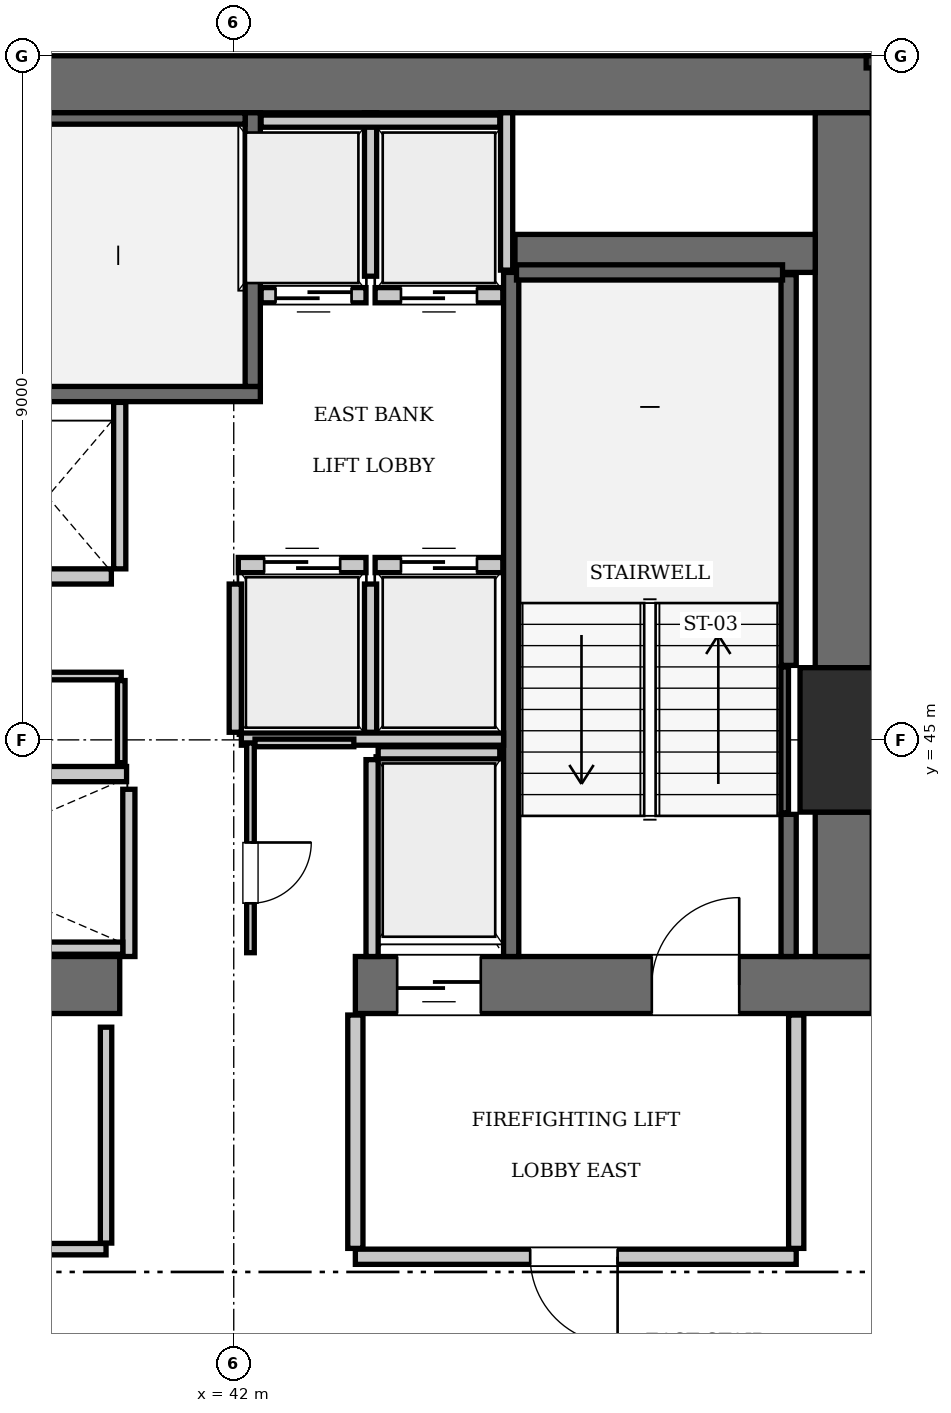
"""IFC4 building model, lengths in metres.
Left out: names, types, materials, properties, quantities, classifications, styles, units other than length and angle.
Written with IfcOpenShell. Run it as: python <this file> out.ifc"""

import sys

from ifc_helpers import new_model, si_unit, direction, frame, frame_2d, origin, origin_2d, place, context, subcontext, project, spatial, rectangle, extrude, element, fill, save


model = new_model("IFC4")
c1 = context("Model", 3, precision=1e-05, world=origin(), true_north=direction((0.0, 1.0)))
c2 = subcontext(c1, "Body", "Model", "MODEL_VIEW")
j1 = project(units=[si_unit("LENGTHUNIT", "METRE"), si_unit("PLANEANGLEUNIT", "RADIAN")], contexts=[c1])
p1 = place(None, origin())
s1 = spatial("IfcSite", under=j1, at=p1, CompositionType="ELEMENT")
p2 = place(p1, origin())
s2 = spatial("IfcBuilding", under=s1, at=p2, CompositionType="ELEMENT")
p3 = place(p2, frame((0.0, 0.0, 169.75)))
s3 = spatial("IfcBuildingStorey", under=s2, at=p3, CompositionType="ELEMENT", Elevation=169.75)
p4 = place(p3, frame((50.4, 45.0, 0.0), z_axis=(0.0, 0.0, 1.0), x_axis=(1.0, 0.0, 0.0)))
e1 = element("IfcColumn", 1, at=p4, inside=s3, PredefinedType="COLUMN", context=c2, shape_type="SweptSolid", body=[
    extrude(rectangle(XDim=1.9, YDim=1.9, at=origin_2d()), origin(), (0.0, 0.0, 1.0), 3.85),
])
p5 = place(p3, frame((25.2, 53.625, 0.0), z_axis=(0.0, 0.0, 1.0), x_axis=(1.0, 0.0, 0.0)))
e2 = element("IfcWall", 2, at=p5, inside=s3, PredefinedType="SHEAR", context=c2, shape_type="SweptSolid", body=[
    extrude(rectangle(XDim=25.2, YDim=0.75, at=frame_2d((12.6, 0.0))), origin(), (0.0, 0.0, 1.0), 3.85),
])
p6 = place(p3, frame((35.1, 41.775, 0.0), z_axis=(0.0, 0.0, 1.0), x_axis=(1.0, 0.0, 0.0)))
e3 = element("IfcWall", 3, at=p6, inside=s3, PredefinedType="SHEAR", context=c2, shape_type="SweptSolid", body=[
    extrude(rectangle(XDim=5.4, YDim=0.75, at=frame_2d((2.7, 0.0))), origin(), (0.0, 0.0, 1.0), 3.85),
])
p7 = place(p3, frame((43.6, 41.775, 0.0), z_axis=(0.0, 0.0, 1.0), x_axis=(1.0, 0.0, 0.0)))
e4 = element("IfcWall", 4, at=p7, inside=s3, PredefinedType="SHEAR", context=c2, shape_type="SweptSolid", body=[
    extrude(rectangle(XDim=6.8, YDim=0.75, at=frame_2d((3.4, 0.0))), origin(), (0.0, 0.0, 1.0), 3.85),
])
p8 = place(p7, frame((3.9, 0.0, 0.0)))
e5 = element("IfcOpeningElement", 5, at=p8, cuts=e4, PredefinedType="OPENING", context=c2, shape_type="SweptSolid", body=[
    extrude(rectangle(XDim=1.15, YDim=2.15, at=frame_2d((0.575, 1.075))), frame((0.0, 0.385, 0.0), z_axis=(0.0, -1.0, 0.0), x_axis=(1.0, 0.0, 0.0)), (0.0, 0.0, 1.0), 0.77),
])
p9 = place(p7, frame((0.55, 0.0, 0.0)))
e6 = element("IfcOpeningElement", 6, at=p9, cuts=e4, PredefinedType="OPENING", context=c2, shape_type="SweptSolid", body=[
    extrude(rectangle(XDim=1.1, YDim=2.2, at=frame_2d((0.55, 1.1))), frame((0.0, 0.385, 0.0), z_axis=(0.0, -1.0, 0.0), x_axis=(1.0, 0.0, 0.0)), (0.0, 0.0, 1.0), 0.77),
])
p10 = place(p3, frame((50.025, 42.15, 0.0), z_axis=(0.0, 0.0, 1.0), x_axis=(0.0, 1.0, 0.0)))
e7 = element("IfcWall", 7, at=p10, inside=s3, PredefinedType="SHEAR", context=c2, shape_type="SweptSolid", body=[
    extrude(rectangle(XDim=1.9, YDim=0.75, at=frame_2d((0.95, 0.0))), origin(), (0.0, 0.0, 1.0), 3.85),
])
p11 = place(p3, frame((50.025, 45.95, 0.0), z_axis=(0.0, 0.0, 1.0), x_axis=(0.0, 1.0, 0.0)))
e8 = element("IfcWall", 8, at=p11, inside=s3, PredefinedType="SHEAR", context=c2, shape_type="SweptSolid", body=[
    extrude(rectangle(XDim=7.3, YDim=0.75, at=frame_2d((3.65, 0.0))), origin(), (0.0, 0.0, 1.0), 3.85),
])
p12 = place(p3, frame((45.7, 51.4, 0.0), z_axis=(0.0, 0.0, 1.0), x_axis=(1.0, 0.0, 0.0)))
e9 = element("IfcWall", 9, at=p12, inside=s3, PredefinedType="SHEAR", context=c2, shape_type="SweptSolid", body=[
    extrude(rectangle(XDim=3.95, YDim=0.5, at=frame_2d((1.975, 0.0))), origin(), (0.0, 0.0, 1.0), 3.85),
])
p13 = place(p3, frame((33.25, 49.55, 0.0), z_axis=(0.0, 0.0, 1.0), x_axis=(1.0, 0.0, 0.0)))
e10 = element("IfcWall", 10, at=p13, inside=s3, PredefinedType="SOLIDWALL", context=c2, shape_type="SweptSolid", body=[
    extrude(rectangle(XDim=9.1, YDim=0.2, at=frame_2d((4.55, 0.0))), origin(), (0.0, 0.0, 1.0), 3.61),
])
p14 = place(p3, frame((42.25, 49.65, 0.0), z_axis=(0.0, 0.0, 1.0), x_axis=(0.0, 1.0, 0.0)))
e11 = element("IfcWall", 11, at=p14, inside=s3, PredefinedType="SOLIDWALL", context=c2, shape_type="SweptSolid", body=[
    extrude(rectangle(XDim=3.6, YDim=0.2, at=frame_2d((1.8, 0.0))), origin(), (0.0, 0.0, 1.0), 3.61),
])
p15 = place(p3, frame((33.45, 53.175, 0.0), z_axis=(0.0, 0.0, 1.0), x_axis=(1.0, 0.0, 0.0)))
e12 = element("IfcWall", 12, at=p15, inside=s3, PredefinedType="SOLIDWALL", context=c2, shape_type="SweptSolid", body=[
    extrude(rectangle(XDim=8.7, YDim=0.15, at=frame_2d((4.35, 0.0))), origin(), (0.0, 0.0, 1.0), 3.61),
])
p16 = place(p3, frame((45.65, 42.15, 0.0), z_axis=(0.0, 0.0, 1.0), x_axis=(0.0, 1.0, 0.0)))
e13 = element("IfcWall", 13, at=p16, inside=s3, PredefinedType="SOLIDWALL", context=c2, shape_type="SweptSolid", body=[
    extrude(rectangle(XDim=9.0, YDim=0.2, at=frame_2d((4.5, 0.0))), origin(), (0.0, 0.0, 1.0), 3.61),
])
p17 = place(p3, frame((49.3, 42.15, 0.0), z_axis=(0.0, 0.0, 1.0), x_axis=(0.0, 1.0, 0.0)))
e14 = element("IfcWall", 14, at=p17, inside=s3, PredefinedType="SOLIDWALL", context=c2, shape_type="SweptSolid", body=[
    extrude(rectangle(XDim=1.87, YDim=0.2, at=frame_2d((0.935, 0.0))), origin(), (0.0, 0.0, 1.0), 3.61),
])
p18 = place(p3, frame((49.3, 45.98, 0.0), z_axis=(0.0, 0.0, 1.0), x_axis=(0.0, 1.0, 0.0)))
e15 = element("IfcWall", 15, at=p18, inside=s3, PredefinedType="SOLIDWALL", context=c2, shape_type="SweptSolid", body=[
    extrude(rectangle(XDim=5.14, YDim=0.2, at=frame_2d((2.57, 0.0))), origin(), (0.0, 0.0, 1.0), 3.61),
])
p19 = place(p3, frame((45.72, 51.15, 0.0), z_axis=(0.0, 0.0, 1.0), x_axis=(1.0, 0.0, 0.0)))
e16 = element("IfcWall", 16, at=p19, inside=s3, PredefinedType="SOLIDWALL", context=c2, shape_type="SweptSolid", body=[
    extrude(rectangle(XDim=3.5, YDim=0.2, at=frame_2d((1.75, 0.0))), origin(), (0.0, 0.0, 1.0), 3.61),
])
p20 = place(p3, frame((49.248, 44.04, 0.0), z_axis=(0.0, 0.0, 1.0), x_axis=(0.0, 1.0, 0.0)))
e17 = element("IfcWall", 17, at=p20, inside=s3, PredefinedType="SOLIDWALL", context=c2, shape_type="SweptSolid", body=[
    extrude(rectangle(XDim=1.92, YDim=0.1, at=frame_2d((0.96, 0.0))), origin(), (0.0, 0.0, 1.0), 3.61),
])
p21 = place(p3, frame((42.06, 47.3, 0.0), z_axis=(0.0, 0.0, 1.0), x_axis=(1.0, 0.0, 0.0)))
e18 = element("IfcWall", 18, at=p21, inside=s3, PredefinedType="SOLIDWALL", context=c2, shape_type="SweptSolid", body=[
    extrude(rectangle(XDim=1.68, YDim=0.2, at=frame_2d((0.84, 0.0))), origin(), (0.0, 0.0, 1.0), 3.61),
])
p22 = place(p21, frame((0.34, 0.0, 0.0)))
e19 = element("IfcOpeningElement", 19, at=p22, cuts=e18, PredefinedType="OPENING", context=c2, shape_type="SweptSolid", body=[
    extrude(rectangle(XDim=1.0, YDim=2.15, at=frame_2d((0.5, 1.075))), frame((0.0, 0.11, 0.0), z_axis=(0.0, -1.0, 0.0), x_axis=(1.0, 0.0, 0.0)), (0.0, 0.0, 1.0), 0.22),
])
p23 = place(p3, frame((43.86, 47.3, 0.0), z_axis=(0.0, 0.0, 1.0), x_axis=(1.0, 0.0, 0.0)))
e20 = element("IfcWall", 20, at=p23, inside=s3, PredefinedType="SOLIDWALL", context=c2, shape_type="SweptSolid", body=[
    extrude(rectangle(XDim=1.68, YDim=0.2, at=frame_2d((0.84, 0.0))), origin(), (0.0, 0.0, 1.0), 3.61),
])
p24 = place(p23, frame((0.34, 0.0, 0.0)))
e21 = element("IfcOpeningElement", 21, at=p24, cuts=e20, PredefinedType="OPENING", context=c2, shape_type="SweptSolid", body=[
    extrude(rectangle(XDim=1.0, YDim=2.15, at=frame_2d((0.5, 1.075))), frame((0.0, 0.11, 0.0), z_axis=(0.0, -1.0, 0.0), x_axis=(1.0, 0.0, 0.0)), (0.0, 0.0, 1.0), 0.22),
])
p25 = place(p3, frame((42.36, 50.85, 0.0), z_axis=(0.0, 0.0, 1.0), x_axis=(1.0, 0.0, 0.0)))
e22 = element("IfcWall", 22, at=p25, inside=s3, PredefinedType="SOLIDWALL", context=c2, shape_type="SweptSolid", body=[
    extrude(rectangle(XDim=1.38, YDim=0.2, at=frame_2d((0.69, 0.0))), origin(), (0.0, 0.0, 1.0), 3.61),
])
p26 = place(p25, frame((0.19, 0.0, 0.0)))
e23 = element("IfcOpeningElement", 23, at=p26, cuts=e22, PredefinedType="OPENING", context=c2, shape_type="SweptSolid", body=[
    extrude(rectangle(XDim=1.0, YDim=2.15, at=frame_2d((0.5, 1.075))), frame((0.0, 0.11, 0.0), z_axis=(0.0, -1.0, 0.0), x_axis=(1.0, 0.0, 0.0)), (0.0, 0.0, 1.0), 0.22),
])
p27 = place(p3, frame((43.86, 50.85, 0.0), z_axis=(0.0, 0.0, 1.0), x_axis=(1.0, 0.0, 0.0)))
e24 = element("IfcWall", 24, at=p27, inside=s3, PredefinedType="SOLIDWALL", context=c2, shape_type="SweptSolid", body=[
    extrude(rectangle(XDim=1.68, YDim=0.2, at=frame_2d((0.84, 0.0))), origin(), (0.0, 0.0, 1.0), 3.61),
])
p28 = place(p27, frame((0.34, 0.0, 0.0)))
e25 = element("IfcOpeningElement", 25, at=p28, cuts=e24, PredefinedType="OPENING", context=c2, shape_type="SweptSolid", body=[
    extrude(rectangle(XDim=1.0, YDim=2.15, at=frame_2d((0.5, 1.075))), frame((0.0, 0.11, 0.0), z_axis=(0.0, -1.0, 0.0), x_axis=(1.0, 0.0, 0.0)), (0.0, 0.0, 1.0), 0.22),
])
p29 = place(p3, frame((38.91, 44.55, 0.0), z_axis=(0.0, 0.0, 1.0), x_axis=(1.0, 0.0, 0.0)))
e26 = element("IfcWall", 26, at=p29, inside=s3, PredefinedType="SOLIDWALL", context=c2, shape_type="SweptSolid", body=[
    extrude(rectangle(XDim=1.68, YDim=0.2, at=frame_2d((0.84, 0.0))), origin(), (0.0, 0.0, 1.0), 3.61),
])
p30 = place(p3, frame((38.71, 47.15, 0.0), z_axis=(0.0, 0.0, 1.0), x_axis=(1.0, 0.0, 0.0)))
e27 = element("IfcWall", 27, at=p30, inside=s3, PredefinedType="SOLIDWALL", context=c2, shape_type="SweptSolid", body=[
    extrude(rectangle(XDim=1.68, YDim=0.2, at=frame_2d((0.84, 0.0))), origin(), (0.0, 0.0, 1.0), 3.61),
])
p31 = place(p3, frame((43.9, 44.83, 0.0), z_axis=(0.0, 0.0, 1.0), x_axis=(1.0, 0.0, 0.0)))
e28 = element("IfcWall", 28, at=p31, inside=s3, PredefinedType="SOLIDWALL", context=c2, shape_type="SweptSolid", body=[
    extrude(rectangle(XDim=1.6, YDim=0.16, at=frame_2d((0.8, 0.0))), origin(), (0.0, 0.0, 1.0), 3.61),
])
p32 = place(p3, frame((43.82, 42.15, 0.0), z_axis=(0.0, 0.0, 1.0), x_axis=(0.0, 1.0, 0.0)))
e29 = element("IfcWall", 29, at=p32, inside=s3, PredefinedType="SOLIDWALL", context=c2, shape_type="SweptSolid", body=[
    extrude(rectangle(XDim=2.59, YDim=0.16, at=frame_2d((1.295, 0.0))), origin(), (0.0, 0.0, 1.0), 3.61),
])
for number, where, z_axis, x_axis in (
    (30, (42.02, 45.1, 0.0), (0.0, 0.0, 1.0), (0.0, 1.0, 0.0)),
    (31, (43.8, 45.1, 0.0), (0.0, 0.0, 1.0), (0.0, 1.0, 0.0)),
):
    element("IfcWall", number, at=place(p3, frame(where, z_axis=z_axis, x_axis=x_axis)), inside=s3, PredefinedType="SOLIDWALL", context=c2, shape_type="SweptSolid", body=[
        extrude(rectangle(XDim=1.95, YDim=0.16, at=frame_2d((0.975, 0.0))), origin(), (0.0, 0.0, 1.0), 3.61),
    ])
p33 = place(p3, frame((42.1, 45.01, 0.0), z_axis=(0.0, 0.0, 1.0), x_axis=(1.0, 0.0, 0.0)))
e32 = element("IfcWall", 32, at=p33, inside=s3, PredefinedType="SOLIDWALL", context=c2, shape_type="SweptSolid", body=[
    extrude(rectangle(XDim=3.45, YDim=0.16, at=frame_2d((1.725, 0.0))), origin(), (0.0, 0.0, 1.0), 3.61),
])
p34 = place(p3, frame((45.59, 51.18, 0.0), z_axis=(0.0, 0.0, 1.0), x_axis=(0.0, 1.0, 0.0)))
e33 = element("IfcWall", 33, at=p34, inside=s3, PredefinedType="SOLIDWALL", context=c2, shape_type="SweptSolid", body=[
    extrude(rectangle(XDim=2.07, YDim=0.16, at=frame_2d((1.035, 0.0))), origin(), (0.0, 0.0, 1.0), 3.61),
])
p35 = place(p3, frame((43.8, 51.1, 0.0), z_axis=(0.0, 0.0, 1.0), x_axis=(0.0, 1.0, 0.0)))
e34 = element("IfcWall", 34, at=p35, inside=s3, PredefinedType="SOLIDWALL", context=c2, shape_type="SweptSolid", body=[
    extrude(rectangle(XDim=2.15, YDim=0.16, at=frame_2d((1.075, 0.0))), origin(), (0.0, 0.0, 1.0), 3.61),
])
p36 = place(p3, frame((42.36, 53.14, 0.0), z_axis=(0.0, 0.0, 1.0), x_axis=(1.0, 0.0, 0.0)))
e35 = element("IfcWall", 35, at=p36, inside=s3, PredefinedType="SOLIDWALL", context=c2, shape_type="SweptSolid", body=[
    extrude(rectangle(XDim=3.14, YDim=0.16, at=frame_2d((1.57, 0.0))), origin(), (0.0, 0.0, 1.0), 3.61),
])
p37 = place(p3, frame((40.62, 42.15, 0.0), z_axis=(0.0, 0.0, 1.0), x_axis=(0.0, 1.0, 0.0)))
e36 = element("IfcWall", 36, at=p37, inside=s3, PredefinedType="SOLIDWALL", context=c2, shape_type="SweptSolid", body=[
    extrude(rectangle(XDim=2.2, YDim=0.16, at=frame_2d((1.1, 0.0))), origin(), (0.0, 0.0, 1.0), 3.61),
])
p38 = place(p3, frame((35.52, 42.26, 0.0), z_axis=(0.0, 0.0, 1.0), x_axis=(1.0, 0.0, 0.0)))
e37 = element("IfcWall", 37, at=p38, inside=s3, PredefinedType="SOLIDWALL", context=c2, shape_type="SweptSolid", body=[
    extrude(rectangle(XDim=5.02, YDim=0.16, at=frame_2d((2.51, 0.0))), origin(), (0.0, 0.0, 1.0), 3.61),
])
p39 = place(p3, frame((40.5, 47.25, 0.0), z_axis=(0.0, 0.0, 1.0), x_axis=(0.0, 1.0, 0.0)))
e38 = element("IfcWall", 38, at=p39, inside=s3, PredefinedType="SOLIDWALL", context=c2, shape_type="SweptSolid", body=[
    extrude(rectangle(XDim=2.19, YDim=0.16, at=frame_2d((1.095, 0.0))), origin(), (0.0, 0.0, 1.0), 3.61),
])
p40 = place(p3, frame((43.6, 38.2, 0.0), z_axis=(0.0, 0.0, 1.0), x_axis=(1.0, 0.0, 0.0)))
e39 = element("IfcWall", 39, at=p40, inside=s3, PredefinedType="PARTITIONING", context=c2, shape_type="SweptSolid", body=[
    extrude(rectangle(XDim=5.8, YDim=0.2, at=frame_2d((2.9, 0.0))), origin(), (0.0, 0.0, 1.0), 3.61),
])
p41 = place(p40, frame((2.3, 0.0, 0.0)))
e40 = element("IfcOpeningElement", 40, at=p41, cuts=e39, PredefinedType="OPENING", context=c2, shape_type="SweptSolid", body=[
    extrude(rectangle(XDim=1.15, YDim=2.15, at=frame_2d((0.575, 1.075))), frame((0.0, 0.11, 0.0), z_axis=(0.0, -1.0, 0.0), x_axis=(1.0, 0.0, 0.0)), (0.0, 0.0, 1.0), 0.22),
])
for number, where, z_axis, x_axis in (
    (41, (43.6, 38.31, 0.0), (0.0, 0.0, 1.0), (0.0, 1.0, 0.0)),
    (42, (49.4, 38.31, 0.0), (0.0, 0.0, 1.0), (0.0, 1.0, 0.0)),
):
    element("IfcWall", number, at=place(p3, frame(where, z_axis=z_axis, x_axis=x_axis)), inside=s3, PredefinedType="PARTITIONING", context=c2, shape_type="SweptSolid", body=[
        extrude(rectangle(XDim=3.07, YDim=0.2, at=frame_2d((1.535, 0.0))), origin(), (0.0, 0.0, 1.0), 3.61),
    ])
p42 = place(p3, frame((38.02, 45.84, 0.0), z_axis=(0.0, 0.0, 1.0), x_axis=(1.0, 0.0, 0.0)))
e43 = element("IfcWall", 43, at=p42, inside=s3, PredefinedType="PARTITIONING", context=c2, shape_type="SweptSolid", body=[
    extrude(rectangle(XDim=2.5, YDim=0.1, at=frame_2d((1.25, 0.0))), origin(), (0.0, 0.0, 1.0), 3.61),
])
p43 = place(p42, frame((0.75, 0.0, 0.0)))
e44 = element("IfcOpeningElement", 44, at=p43, cuts=e43, PredefinedType="OPENING", context=c2, shape_type="SweptSolid", body=[
    extrude(rectangle(XDim=0.8, YDim=2.05, at=frame_2d((0.4, 1.025))), frame((0.0, 0.06, 0.0), z_axis=(0.0, -1.0, 0.0), x_axis=(1.0, 0.0, 0.0)), (0.0, 0.0, 1.0), 0.12),
])
p44 = place(p3, frame((40.52, 44.7, 0.0), z_axis=(0.0, 0.0, 1.0), x_axis=(0.0, 1.0, 0.0)))
e45 = element("IfcWall", 45, at=p44, inside=s3, PredefinedType="PARTITIONING", context=c2, shape_type="SweptSolid", body=[
    extrude(rectangle(XDim=1.08, YDim=0.1, at=frame_2d((0.54, 0.0))), origin(), (0.0, 0.0, 1.0), 3.61),
])
p45 = place(p3, frame((42.22, 42.2, 0.0), z_axis=(0.0, 0.0, 1.0), x_axis=(0.0, 1.0, 0.0)))
e46 = element("IfcWall", 46, at=p45, inside=s3, PredefinedType="PARTITIONING", context=c2, shape_type="SweptSolid", body=[
    extrude(rectangle(XDim=2.76, YDim=0.1, at=frame_2d((1.38, 0.0))), origin(), (0.0, 0.0, 1.0), 3.61),
])
p46 = place(p45, frame((0.65, 0.0, 0.0)))
e47 = element("IfcOpeningElement", 47, at=p46, cuts=e46, PredefinedType="OPENING", context=c2, shape_type="SweptSolid", body=[
    extrude(rectangle(XDim=0.8, YDim=2.05, at=frame_2d((0.4, 1.025))), frame((0.0, 0.06, 0.0), z_axis=(0.0, -1.0, 0.0), x_axis=(1.0, 0.0, 0.0)), (0.0, 0.0, 1.0), 0.12),
])
p47 = place(p3, frame((42.28, 44.96, 0.0), z_axis=(0.0, 0.0, 1.0), x_axis=(1.0, 0.0, 0.0)))
e48 = element("IfcWall", 48, at=p47, inside=s3, PredefinedType="PARTITIONING", context=c2, shape_type="SweptSolid", body=[
    extrude(rectangle(XDim=1.3, YDim=0.1, at=frame_2d((0.65, 0.0))), origin(), (0.0, 0.0, 1.0), 3.61),
])
p48 = place(p3, frame((37.38, 38.3, 0.0), z_axis=(0.0, 0.0, 1.0), x_axis=(1.0, 0.0, 0.0)))
e49 = element("IfcWall", 49, at=p48, inside=s3, PredefinedType="PARTITIONING", context=c2, shape_type="SweptSolid", body=[
    extrude(rectangle(XDim=2.94, YDim=0.15, at=frame_2d((1.47, 0.0))), origin(), (0.0, 0.0, 1.0), 3.61),
])
p49 = place(p48, frame((1.0, 0.0, 0.0)))
e50 = element("IfcOpeningElement", 50, at=p49, cuts=e49, PredefinedType="OPENING", context=c2, shape_type="SweptSolid", body=[
    extrude(rectangle(XDim=0.8, YDim=2.05, at=frame_2d((0.4, 1.025))), frame((0.0, 0.085, 0.0), z_axis=(0.0, -1.0, 0.0), x_axis=(1.0, 0.0, 0.0)), (0.0, 0.0, 1.0), 0.17),
])
p50 = place(p3, frame((40.32, 38.38, 0.0), z_axis=(0.0, 0.0, 1.0), x_axis=(0.0, 1.0, 0.0)))
e51 = element("IfcWall", 51, at=p50, inside=s3, PredefinedType="PARTITIONING", context=c2, shape_type="SweptSolid", body=[
    extrude(rectangle(XDim=2.84, YDim=0.15, at=frame_2d((1.42, 0.0))), origin(), (0.0, 0.0, 1.0), 3.61),
])
p51 = place(p8, origin())
e52 = element("IfcDoor", 52, at=p51, inside=s3, OperationType="SINGLE_SWING_RIGHT", PredefinedType="DOOR", context=c2, shape_type="SweptSolid", body=[
    extrude(rectangle(XDim=1.15, YDim=2.15, at=frame_2d((0.575, 1.075))), frame((0.0, 0.025, 0.0), z_axis=(0.0, -1.0, 0.0), x_axis=(1.0, 0.0, 0.0)), (0.0, 0.0, 1.0), 0.05),
])
fill(e5, e52)
p52 = place(p22, origin())
e53 = element("IfcDoor", 53, at=p52, inside=s3, OperationType="SLIDING_TO_LEFT", PredefinedType="DOOR", context=c2, shape_type="SweptSolid", body=[
    extrude(rectangle(XDim=1.0, YDim=2.15, at=frame_2d((0.5, 1.075))), frame((0.0, 0.025, 0.0), z_axis=(0.0, -1.0, 0.0), x_axis=(1.0, 0.0, 0.0)), (0.0, 0.0, 1.0), 0.05),
])
fill(e19, e53)
p53 = place(p24, origin())
e54 = element("IfcDoor", 54, at=p53, inside=s3, OperationType="SLIDING_TO_LEFT", PredefinedType="DOOR", context=c2, shape_type="SweptSolid", body=[
    extrude(rectangle(XDim=1.0, YDim=2.15, at=frame_2d((0.5, 1.075))), frame((0.0, 0.025, 0.0), z_axis=(0.0, -1.0, 0.0), x_axis=(1.0, 0.0, 0.0)), (0.0, 0.0, 1.0), 0.05),
])
fill(e21, e54)
p54 = place(p26, frame((1.0, 0.0, 0.0), z_axis=(0.0, 0.0, 1.0), x_axis=(-1.0, 0.0, 0.0)))
e55 = element("IfcDoor", 55, at=p54, inside=s3, OperationType="SLIDING_TO_LEFT", PredefinedType="DOOR", context=c2, shape_type="SweptSolid", body=[
    extrude(rectangle(XDim=1.0, YDim=2.15, at=frame_2d((0.5, 1.075))), frame((0.0, 0.025, 0.0), z_axis=(0.0, -1.0, 0.0), x_axis=(1.0, 0.0, 0.0)), (0.0, 0.0, 1.0), 0.05),
])
fill(e23, e55)
p55 = place(p28, frame((1.0, 0.0, 0.0), z_axis=(0.0, 0.0, 1.0), x_axis=(-1.0, 0.0, 0.0)))
e56 = element("IfcDoor", 56, at=p55, inside=s3, OperationType="SLIDING_TO_LEFT", PredefinedType="DOOR", context=c2, shape_type="SweptSolid", body=[
    extrude(rectangle(XDim=1.0, YDim=2.15, at=frame_2d((0.5, 1.075))), frame((0.0, 0.025, 0.0), z_axis=(0.0, -1.0, 0.0), x_axis=(1.0, 0.0, 0.0)), (0.0, 0.0, 1.0), 0.05),
])
fill(e25, e56)
p56 = place(p9, frame((1.1, 0.0, 0.0), z_axis=(0.0, 0.0, 1.0), x_axis=(-1.0, 0.0, 0.0)))
e57 = element("IfcDoor", 57, at=p56, inside=s3, OperationType="SLIDING_TO_LEFT", PredefinedType="DOOR", context=c2, shape_type="SweptSolid", body=[
    extrude(rectangle(XDim=1.1, YDim=2.2, at=frame_2d((0.55, 1.1))), frame((0.0, 0.025, 0.0), z_axis=(0.0, -1.0, 0.0), x_axis=(1.0, 0.0, 0.0)), (0.0, 0.0, 1.0), 0.05),
])
fill(e6, e57)
p57 = place(p41, frame((1.15, 0.0, 0.0), z_axis=(0.0, 0.0, 1.0), x_axis=(-1.0, 0.0, 0.0)))
e58 = element("IfcDoor", 58, at=p57, inside=s3, OperationType="SINGLE_SWING_LEFT", PredefinedType="DOOR", context=c2, shape_type="SweptSolid", body=[
    extrude(rectangle(XDim=1.15, YDim=2.15, at=frame_2d((0.575, 1.075))), frame((0.0, 0.025, 0.0), z_axis=(0.0, -1.0, 0.0), x_axis=(1.0, 0.0, 0.0)), (0.0, 0.0, 1.0), 0.05),
])
fill(e40, e58)
p58 = place(p46, frame((0.8, 0.0, 0.0), z_axis=(0.0, 0.0, 1.0), x_axis=(-1.0, 0.0, 0.0)))
e59 = element("IfcDoor", 59, at=p58, inside=s3, OperationType="SINGLE_SWING_LEFT", PredefinedType="DOOR", context=c2, shape_type="SweptSolid", body=[
    extrude(rectangle(XDim=0.8, YDim=2.05, at=frame_2d((0.4, 1.025))), frame((0.0, 0.025, 0.0), z_axis=(0.0, -1.0, 0.0), x_axis=(1.0, 0.0, 0.0)), (0.0, 0.0, 1.0), 0.05),
])
fill(e47, e59)
save(model, sys.argv[1])
